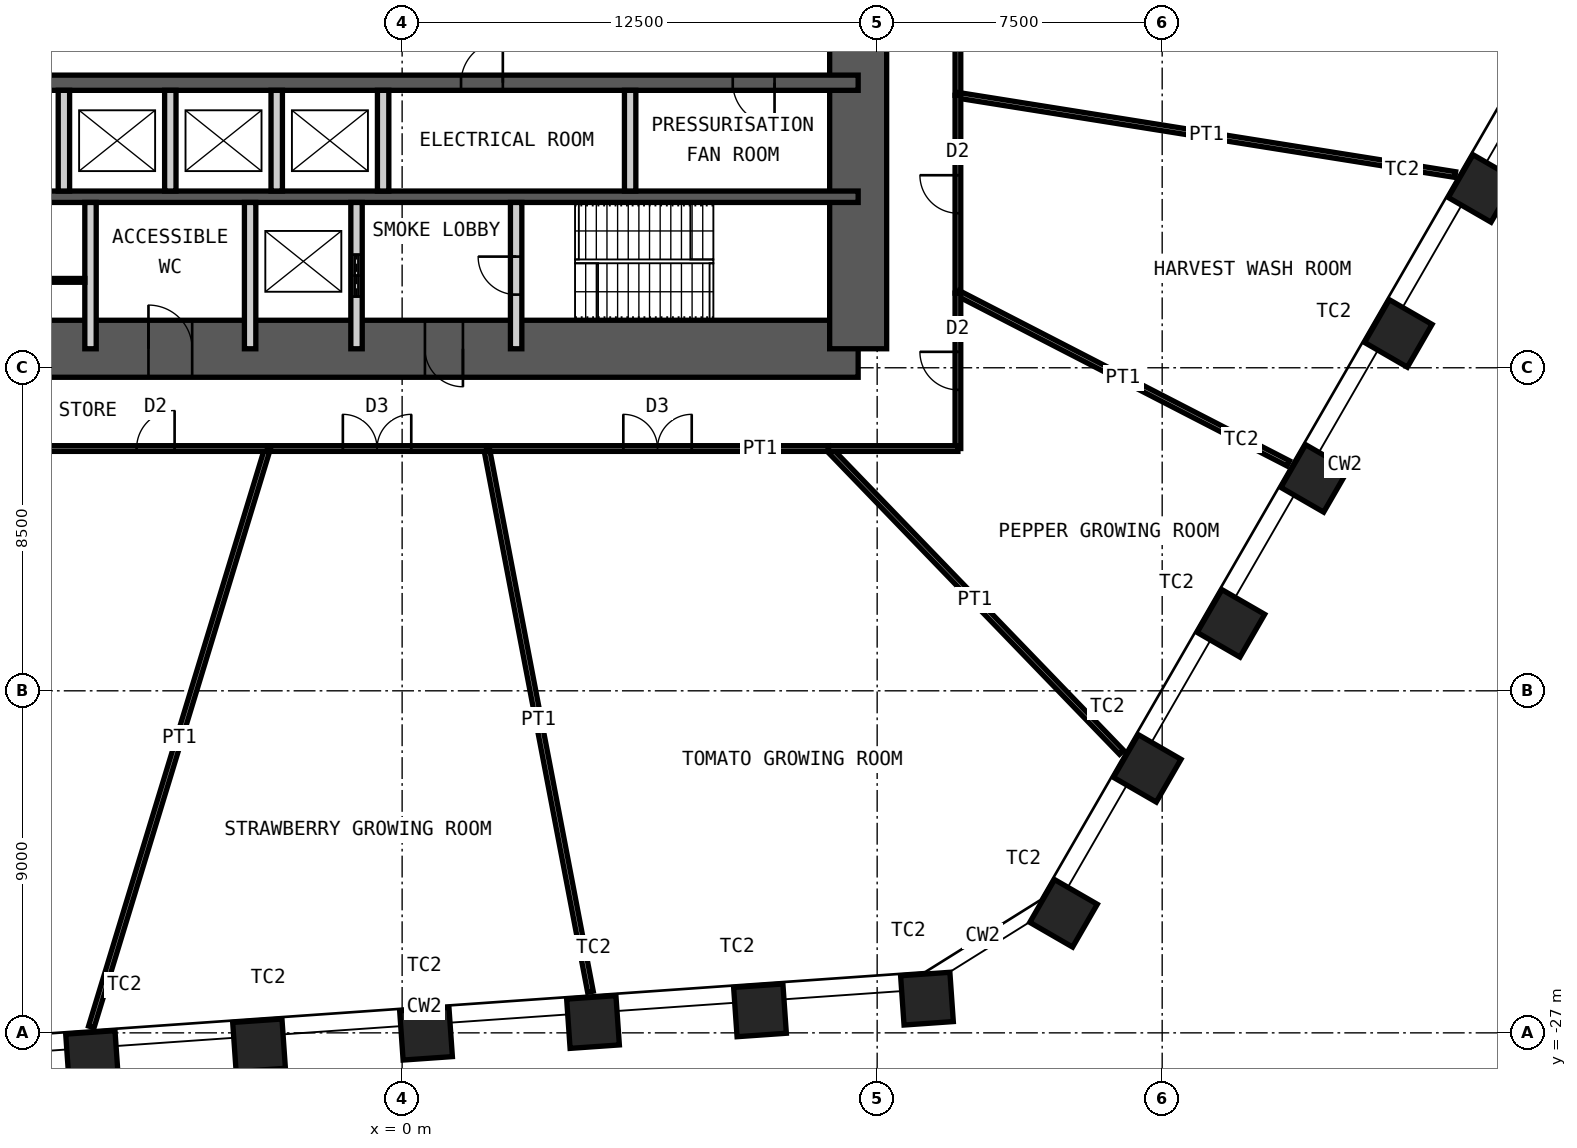
"""IFC4 building model, lengths in metres.
Left out: names, types, materials, properties, quantities, classifications, styles, units other than length and angle.
Written with IfcOpenShell. Run it as: python <this file> out.ifc"""

import sys

from ifc_helpers import new_model, si_unit, direction, frame, frame_2d, origin, origin_2d, place, context, subcontext, project, spatial, rectangle, hollow_rectangle, extrude, element, fill, save


model = new_model("IFC4")
c1 = context("Model", 3, precision=1e-05, world=origin(), true_north=direction((0.0, 1.0)))
c2 = subcontext(c1, "Body", "Model", "MODEL_VIEW")
j1 = project(units=[si_unit("LENGTHUNIT", "METRE"), si_unit("PLANEANGLEUNIT", "RADIAN")], contexts=[c1])
p1 = place(None, origin())
s1 = spatial("IfcSite", under=j1, at=p1, CompositionType="ELEMENT")
p2 = place(p1, origin())
s2 = spatial("IfcBuilding", under=s1, at=p2, CompositionType="ELEMENT")
p3 = place(p2, frame((0.0, 0.0, 72.0)))
s3 = spatial("IfcBuildingStorey", under=s2, at=p3, CompositionType="ELEMENT", Elevation=72.0)
for number, where, z_axis, x_axis in (
    (1, (28.416, -4.782, 0.0), (0.0, 0.0, 1.0), (0.5, 0.866, 0.0)),
    (2, (26.214, -8.596, 0.0), (0.0, 0.0, 1.0), (0.5, 0.866, 0.0)),
    (3, (24.011, -12.411, 0.0), (0.0, 0.0, 1.0), (0.5, 0.866, 0.0)),
    (4, (21.809, -16.225, 0.0), (0.0, 0.0, 1.0), (0.5, 0.866, 0.0)),
    (5, (19.607, -20.04, 0.0), (0.0, 0.0, 1.0), (0.5, 0.866, 0.0)),
    (6, (17.405, -23.854, 0.0), (0.0, 0.0, 1.0), (0.5, 0.866, 0.0)),
    (7, (13.811, -26.1, 0.0), (0.0, 0.0, 1.0), (0.998, 0.07, 0.0)),
    (8, (9.417, -26.407, 0.0), (0.0, 0.0, 1.0), (0.998, 0.07, 0.0)),
    (9, (5.023, -26.715, 0.0), (0.0, 0.0, 1.0), (0.998, 0.07, 0.0)),
    (10, (0.629, -27.022, 0.0), (0.0, 0.0, 1.0), (0.998, 0.07, 0.0)),
    (11, (-3.765, -27.329, 0.0), (0.0, 0.0, 1.0), (0.998, 0.07, 0.0)),
    (12, (-8.159, -27.636, 0.0), (0.0, 0.0, 1.0), (0.998, 0.07, 0.0)),
):
    element("IfcColumn", number, at=place(p3, frame(where, z_axis=z_axis, x_axis=x_axis)), inside=s3, PredefinedType="COLUMN", context=c2, shape_type="SweptSolid", body=[
        extrude(hollow_rectangle(XDim=1.3, YDim=1.3, WallThickness=0.1, at=origin_2d()), origin(), (0.0, 0.0, 1.0), 5.0),
    ])
p4 = place(p3, frame((-12.0, -9.0, 0.0), z_axis=(0.0, 0.0, 1.0), x_axis=(1.0, 0.0, 0.0)))
e13 = element("IfcWall", 13, at=p4, inside=s3, PredefinedType="SHEAR", context=c2, shape_type="SweptSolid", body=[
    extrude(rectangle(XDim=24.0, YDim=1.5, at=frame_2d((12.0, 0.0))), origin(), (0.0, 0.0, 1.0), 5.0),
])
p5 = place(p4, frame((1.35, 0.0, 0.0)))
e14 = element("IfcOpeningElement", 14, at=p5, cuts=e13, PredefinedType="OPENING", context=c2, shape_type="SweptSolid", body=[
    extrude(rectangle(XDim=1.0, YDim=2.1, at=frame_2d((0.5, 1.05))), frame((0.0, 0.76, 0.0), z_axis=(0.0, -1.0, 0.0), x_axis=(1.0, 0.0, 0.0)), (0.0, 0.0, 1.0), 1.52),
])
p6 = place(p4, frame((5.325, 0.0, 0.0)))
e15 = element("IfcOpeningElement", 15, at=p6, cuts=e13, PredefinedType="OPENING", context=c2, shape_type="SweptSolid", body=[
    extrude(rectangle(XDim=1.15, YDim=2.1, at=frame_2d((0.575, 1.05))), frame((0.0, 0.76, 0.0), z_axis=(0.0, -1.0, 0.0), x_axis=(1.0, 0.0, 0.0)), (0.0, 0.0, 1.0), 1.52),
])
p7 = place(p4, frame((12.6, 0.0, 0.0)))
e16 = element("IfcOpeningElement", 16, at=p7, cuts=e13, PredefinedType="OPENING", context=c2, shape_type="SweptSolid", body=[
    extrude(rectangle(XDim=1.0, YDim=2.1, at=frame_2d((0.5, 1.05))), frame((0.0, 0.76, 0.0), z_axis=(0.0, -1.0, 0.0), x_axis=(1.0, 0.0, 0.0)), (0.0, 0.0, 1.0), 1.52),
])
p8 = place(p3, frame((12.0, -9.0, 0.0), z_axis=(0.0, 0.0, 1.0), x_axis=(0.0, 1.0, 0.0)))
e17 = element("IfcWall", 17, at=p8, inside=s3, PredefinedType="SHEAR", context=c2, shape_type="SweptSolid", body=[
    extrude(rectangle(XDim=18.0, YDim=1.5, at=frame_2d((9.0, 0.0))), origin(), (0.0, 0.0, 1.0), 5.0),
])
p9 = place(p8, frame((8.1, 0.0, 0.0)))
e18 = element("IfcOpeningElement", 18, at=p9, cuts=e17, PredefinedType="OPENING", context=c2, shape_type="SweptSolid", body=[
    extrude(rectangle(XDim=1.8, YDim=2.1, at=frame_2d((0.9, 1.05))), frame((0.0, 0.76, 0.0), z_axis=(0.0, -1.0, 0.0), x_axis=(1.0, 0.0, 0.0)), (0.0, 0.0, 1.0), 1.52),
])
p10 = place(p3, frame((-12.0, -2.0, 0.0), z_axis=(0.0, 0.0, 1.0), x_axis=(1.0, 0.0, 0.0)))
e19 = element("IfcWall", 19, at=p10, inside=s3, PredefinedType="SHEAR", context=c2, shape_type="SweptSolid", body=[
    extrude(rectangle(XDim=24.0, YDim=0.4, at=frame_2d((12.0, 0.0))), origin(), (0.0, 0.0, 1.0), 5.0),
])
p11 = place(p10, frame((1.1, 0.0, 0.0)))
e20 = element("IfcOpeningElement", 20, at=p11, cuts=e19, PredefinedType="OPENING", context=c2, shape_type="SweptSolid", body=[
    extrude(rectangle(XDim=1.1, YDim=2.1, at=frame_2d((0.55, 1.05))), frame((0.0, 0.21, 0.0), z_axis=(0.0, -1.0, 0.0), x_axis=(1.0, 0.0, 0.0)), (0.0, 0.0, 1.0), 0.42),
])
p12 = place(p10, frame((13.55, 0.0, 0.0)))
e21 = element("IfcOpeningElement", 21, at=p12, cuts=e19, PredefinedType="OPENING", context=c2, shape_type="SweptSolid", body=[
    extrude(rectangle(XDim=1.1, YDim=2.1, at=frame_2d((0.55, 1.05))), frame((0.0, 0.21, 0.0), z_axis=(0.0, -1.0, 0.0), x_axis=(1.0, 0.0, 0.0)), (0.0, 0.0, 1.0), 0.42),
])
p13 = place(p10, frame((20.7, 0.0, 0.0)))
e22 = element("IfcOpeningElement", 22, at=p13, cuts=e19, PredefinedType="OPENING", context=c2, shape_type="SweptSolid", body=[
    extrude(rectangle(XDim=1.1, YDim=2.1, at=frame_2d((0.55, 1.05))), frame((0.0, 0.21, 0.0), z_axis=(0.0, -1.0, 0.0), x_axis=(1.0, 0.0, 0.0)), (0.0, 0.0, 1.0), 0.42),
])
p14 = place(p3, frame((-12.0, -5.0, 0.0), z_axis=(0.0, 0.0, 1.0), x_axis=(1.0, 0.0, 0.0)))
e23 = element("IfcWall", 23, at=p14, inside=s3, PredefinedType="SHEAR", context=c2, shape_type="SweptSolid", body=[
    extrude(rectangle(XDim=24.0, YDim=0.3, at=frame_2d((12.0, 0.0))), origin(), (0.0, 0.0, 1.0), 5.0),
])
for number, where, z_axis, x_axis in (
    (24, (-8.9, -4.85, 0.0), (0.0, 0.0, 1.0), (0.0, 1.0, 0.0)),
    (25, (-6.1, -4.85, 0.0), (0.0, 0.0, 1.0), (0.0, 1.0, 0.0)),
    (26, (-3.3, -4.85, 0.0), (0.0, 0.0, 1.0), (0.0, 1.0, 0.0)),
    (27, (-0.5, -4.85, 0.0), (0.0, 0.0, 1.0), (0.0, 1.0, 0.0)),
    (28, (6.0, -4.85, 0.0), (0.0, 0.0, 1.0), (0.0, 1.0, 0.0)),
):
    element("IfcWall", number, at=place(p3, frame(where, z_axis=z_axis, x_axis=x_axis)), inside=s3, PredefinedType="PARTITIONING", context=c2, shape_type="SweptSolid", body=[
        extrude(rectangle(XDim=2.65, YDim=0.3, at=frame_2d((1.325, 0.0))), origin(), (0.0, 0.0, 1.0), 4.78),
    ])
for number, where, z_axis, x_axis in (
    (29, (-8.2, -9.0, 0.0), (0.0, 0.0, 1.0), (0.0, 1.0, 0.0)),
    (30, (-4.0, -9.0, 0.0), (0.0, 0.0, 1.0), (0.0, 1.0, 0.0)),
):
    element("IfcWall", number, at=place(p3, frame(where, z_axis=z_axis, x_axis=x_axis)), inside=s3, PredefinedType="PARTITIONING", context=c2, shape_type="SweptSolid", body=[
        extrude(rectangle(XDim=3.85, YDim=0.3, at=frame_2d((1.925, 0.0))), origin(), (0.0, 0.0, 1.0), 4.78),
    ])
p15 = place(p3, frame((-1.2, -9.0, 0.0), z_axis=(0.0, 0.0, 1.0), x_axis=(0.0, 1.0, 0.0)))
e31 = element("IfcWall", 31, at=p15, inside=s3, PredefinedType="PARTITIONING", context=c2, shape_type="SweptSolid", body=[
    extrude(rectangle(XDim=3.85, YDim=0.3, at=frame_2d((1.925, 0.0))), origin(), (0.0, 0.0, 1.0), 4.78),
])
p16 = place(p15, frame((1.375, 0.0, 0.0)))
e32 = element("IfcOpeningElement", 32, at=p16, cuts=e31, PredefinedType="OPENING", context=c2, shape_type="SweptSolid", body=[
    extrude(rectangle(XDim=1.1, YDim=2.4, at=frame_2d((0.55, 1.2))), frame((0.0, 0.16, 0.0), z_axis=(0.0, -1.0, 0.0), x_axis=(1.0, 0.0, 0.0)), (0.0, 0.0, 1.0), 0.32),
])
p17 = place(p3, frame((3.0, -9.0, 0.0), z_axis=(0.0, 0.0, 1.0), x_axis=(0.0, 1.0, 0.0)))
e33 = element("IfcWall", 33, at=p17, inside=s3, PredefinedType="PARTITIONING", context=c2, shape_type="SweptSolid", body=[
    extrude(rectangle(XDim=3.85, YDim=0.3, at=frame_2d((1.925, 0.0))), origin(), (0.0, 0.0, 1.0), 4.78),
])
p18 = place(p17, frame((1.425, 0.0, 0.0)))
e34 = element("IfcOpeningElement", 34, at=p18, cuts=e33, PredefinedType="OPENING", context=c2, shape_type="SweptSolid", body=[
    extrude(rectangle(XDim=1.0, YDim=2.1, at=frame_2d((0.5, 1.05))), frame((0.0, 0.16, 0.0), z_axis=(0.0, -1.0, 0.0), x_axis=(1.0, 0.0, 0.0)), (0.0, 0.0, 1.0), 0.32),
])
p19 = place(p3, frame((-11.25, -7.2, 0.0), z_axis=(0.0, 0.0, 1.0), x_axis=(1.0, 0.0, 0.0)))
e35 = element("IfcWall", 35, at=p19, inside=s3, PredefinedType="PARTITIONING", context=c2, shape_type="SweptSolid", body=[
    extrude(rectangle(XDim=2.9, YDim=0.1, at=frame_2d((1.45, 0.0))), origin(), (0.0, 0.0, 1.0), 4.78),
])
p20 = place(p19, frame((0.1, 0.0, 0.0)))
e36 = element("IfcOpeningElement", 36, at=p20, cuts=e35, PredefinedType="OPENING", context=c2, shape_type="SweptSolid", body=[
    extrude(rectangle(XDim=1.0, YDim=2.4, at=frame_2d((0.5, 1.2))), frame((0.0, 0.06, 0.0), z_axis=(0.0, -1.0, 0.0), x_axis=(1.0, 0.0, 0.0)), (0.0, 0.0, 1.0), 0.12),
])
p21 = place(p3, frame((18.931, -19.618, 0.0), z_axis=(0.0, 0.0, 1.0), x_axis=(-0.694400324326, 0.719588903178, 0.0)))
e37 = element("IfcWall", 37, at=p21, inside=s3, PredefinedType="PARTITIONING", context=c2, shape_type="SweptSolid", body=[
    extrude(rectangle(XDim=11.108, YDim=0.15, at=frame_2d((5.554, 0.0))), origin(), (0.0, 0.0, 1.0), 3.7),
])
p22 = place(p3, frame((11.218, -11.625, 0.0), z_axis=(0.0, 0.0, 1.0), x_axis=(-1.0, 0.0, 0.0)))
e38 = element("IfcWall", 38, at=p22, inside=s3, PredefinedType="PARTITIONING", context=c2, shape_type="SweptSolid", body=[
    extrude(rectangle(XDim=8.996, YDim=0.15, at=frame_2d((4.498, 0.0))), origin(), (0.0, 0.0, 1.0), 4.8),
])
p23 = place(p22, frame((3.598, 0.0, 0.0)))
e39 = element("IfcOpeningElement", 39, at=p23, cuts=e38, PredefinedType="OPENING", context=c2, shape_type="SweptSolid", body=[
    extrude(rectangle(XDim=1.8, YDim=2.4, at=frame_2d((0.9, 1.2))), frame((0.0, 0.085, 0.0), z_axis=(0.0, -1.0, 0.0), x_axis=(1.0, 0.0, 0.0)), (0.0, 0.0, 1.0), 0.17),
])
p24 = place(p3, frame((4.955, -25.918, 0.0), z_axis=(0.0, 0.0, 1.0), x_axis=(-0.187785090129, 0.98221014041, 0.0)))
e40 = element("IfcWall", 40, at=p24, inside=s3, PredefinedType="PARTITIONING", context=c2, shape_type="SweptSolid", body=[
    extrude(rectangle(XDim=14.552, YDim=0.15, at=frame_2d((7.276, 0.0))), origin(), (0.0, 0.0, 1.0), 3.7),
])
p25 = place(p3, frame((2.222, -11.625, 0.0), z_axis=(0.0, 0.0, 1.0), x_axis=(-1.0, 0.0, 0.0)))
e41 = element("IfcWall", 41, at=p25, inside=s3, PredefinedType="PARTITIONING", context=c2, shape_type="SweptSolid", body=[
    extrude(rectangle(XDim=5.764, YDim=0.15, at=frame_2d((2.882, 0.0))), origin(), (0.0, 0.0, 1.0), 4.8),
])
p26 = place(p25, frame((1.982, 0.0, 0.0)))
e42 = element("IfcOpeningElement", 42, at=p26, cuts=e41, PredefinedType="OPENING", context=c2, shape_type="SweptSolid", body=[
    extrude(rectangle(XDim=1.8, YDim=2.4, at=frame_2d((0.9, 1.2))), frame((0.0, 0.085, 0.0), z_axis=(0.0, -1.0, 0.0), x_axis=(1.0, 0.0, 0.0)), (0.0, 0.0, 1.0), 0.17),
])
p27 = place(p3, frame((-8.179, -26.843, 0.0), z_axis=(0.0, 0.0, 1.0), x_axis=(0.291466333136, 0.956581087336, 0.0)))
e43 = element("IfcWall", 43, at=p27, inside=s3, PredefinedType="PARTITIONING", context=c2, shape_type="SweptSolid", body=[
    extrude(rectangle(XDim=15.908, YDim=0.15, at=frame_2d((7.954, 0.0))), origin(), (0.0, 0.0, 1.0), 3.7),
])
p28 = place(p3, frame((-3.542, -11.625, 0.0), z_axis=(0.0, 0.0, 1.0), x_axis=(-1.0, 0.0, 0.0)))
e44 = element("IfcWall", 44, at=p28, inside=s3, PredefinedType="PARTITIONING", context=c2, shape_type="SweptSolid", body=[
    extrude(rectangle(XDim=5.89, YDim=0.15, at=frame_2d((2.945, 0.0))), origin(), (0.0, 0.0, 1.0), 4.8),
])
p29 = place(p28, frame((2.445, 0.0, 0.0)))
e45 = element("IfcOpeningElement", 45, at=p29, cuts=e44, PredefinedType="OPENING", context=c2, shape_type="SweptSolid", body=[
    extrude(rectangle(XDim=1.0, YDim=2.4, at=frame_2d((0.5, 1.2))), frame((0.0, 0.085, 0.0), z_axis=(0.0, -1.0, 0.0), x_axis=(1.0, 0.0, 0.0)), (0.0, 0.0, 1.0), 0.17),
])
p30 = place(p3, frame((14.625, 3.391, 0.0), z_axis=(0.0, 0.0, 1.0), x_axis=(0.0, -1.0, 0.0)))
e46 = element("IfcWall", 46, at=p30, inside=s3, PredefinedType="PARTITIONING", context=c2, shape_type="SweptSolid", body=[
    extrude(rectangle(XDim=5.722, YDim=0.15, at=frame_2d((2.861, 0.0))), origin(), (0.0, 0.0, 1.0), 4.8),
])
p31 = place(p30, frame((2.361, 0.0, 0.0)))
e47 = element("IfcOpeningElement", 47, at=p31, cuts=e46, PredefinedType="OPENING", context=c2, shape_type="SweptSolid", body=[
    extrude(rectangle(XDim=1.0, YDim=2.4, at=frame_2d((0.5, 1.2))), frame((0.0, 0.085, 0.0), z_axis=(0.0, -1.0, 0.0), x_axis=(1.0, 0.0, 0.0)), (0.0, 0.0, 1.0), 0.17),
])
p32 = place(p3, frame((27.711, -4.416, 0.0), z_axis=(0.0, 0.0, 1.0), x_axis=(-0.987538625309, 0.15737682016, 0.0)))
e48 = element("IfcWall", 48, at=p32, inside=s3, PredefinedType="PARTITIONING", context=c2, shape_type="SweptSolid", body=[
    extrude(rectangle(XDim=13.251, YDim=0.15, at=frame_2d((6.625, 0.0))), origin(), (0.0, 0.0, 1.0), 3.7),
])
p33 = place(p3, frame((14.625, -2.331, 0.0), z_axis=(0.0, 0.0, 1.0), x_axis=(0.0, -1.0, 0.0)))
e49 = element("IfcWall", 49, at=p33, inside=s3, PredefinedType="PARTITIONING", context=c2, shape_type="SweptSolid", body=[
    extrude(rectangle(XDim=5.206, YDim=0.15, at=frame_2d((2.603, 0.0))), origin(), (0.0, 0.0, 1.0), 4.8),
])
p34 = place(p33, frame((2.103, 0.0, 0.0)))
e50 = element("IfcOpeningElement", 50, at=p34, cuts=e49, PredefinedType="OPENING", context=c2, shape_type="SweptSolid", body=[
    extrude(rectangle(XDim=1.0, YDim=2.4, at=frame_2d((0.5, 1.2))), frame((0.0, 0.085, 0.0), z_axis=(0.0, -1.0, 0.0), x_axis=(1.0, 0.0, 0.0)), (0.0, 0.0, 1.0), 0.17),
])
p35 = place(p3, frame((23.316, -12.015, 0.0), z_axis=(0.0, 0.0, 1.0), x_axis=(-0.888917561609, 0.458067209767, 0.0)))
e51 = element("IfcWall", 51, at=p35, inside=s3, PredefinedType="PARTITIONING", context=c2, shape_type="SweptSolid", body=[
    extrude(rectangle(XDim=9.778, YDim=0.15, at=frame_2d((4.889, 0.0))), origin(), (0.0, 0.0, 1.0), 3.7),
])
p36 = place(p3, frame((14.625, -7.536, 0.0), z_axis=(0.0, 0.0, 1.0), x_axis=(0.0, -1.0, 0.0)))
e52 = element("IfcWall", 52, at=p36, inside=s3, PredefinedType="PARTITIONING", context=c2, shape_type="SweptSolid", body=[
    extrude(rectangle(XDim=4.089, YDim=0.15, at=frame_2d((2.044, 0.0))), origin(), (0.0, 0.0, 1.0), 4.8),
])
p37 = place(p36, frame((1.544, 0.0, 0.0)))
e53 = element("IfcOpeningElement", 53, at=p37, cuts=e52, PredefinedType="OPENING", context=c2, shape_type="SweptSolid", body=[
    extrude(rectangle(XDim=1.0, YDim=2.4, at=frame_2d((0.5, 1.2))), frame((0.0, 0.085, 0.0), z_axis=(0.0, -1.0, 0.0), x_axis=(1.0, 0.0, 0.0)), (0.0, 0.0, 1.0), 0.17),
])
p38 = place(p3, frame((14.625, -11.625, 0.0), z_axis=(0.0, 0.0, 1.0), x_axis=(-1.0, 0.0, 0.0)))
e54 = element("IfcWall", 54, at=p38, inside=s3, PredefinedType="PARTITIONING", context=c2, shape_type="SweptSolid", body=[
    extrude(rectangle(XDim=3.407, YDim=0.15, at=frame_2d((1.704, 0.0))), origin(), (0.0, 0.0, 1.0), 4.8),
])
p39 = place(p6, origin())
e55 = element("IfcDoor", 55, at=p39, inside=s3, OperationType="SINGLE_SWING_RIGHT", PredefinedType="DOOR", context=c2, shape_type="SweptSolid", body=[
    extrude(rectangle(XDim=1.15, YDim=2.1, at=frame_2d((0.575, 1.05))), frame((0.0, 0.025, 0.0), z_axis=(0.0, -1.0, 0.0), x_axis=(1.0, 0.0, 0.0)), (0.0, 0.0, 1.0), 0.05),
])
fill(e15, e55)
p40 = place(p7, origin())
e56 = element("IfcDoor", 56, at=p40, inside=s3, OperationType="SINGLE_SWING_RIGHT", PredefinedType="DOOR", context=c2, shape_type="SweptSolid", body=[
    extrude(rectangle(XDim=1.0, YDim=2.1, at=frame_2d((0.5, 1.05))), frame((0.0, 0.025, 0.0), z_axis=(0.0, -1.0, 0.0), x_axis=(1.0, 0.0, 0.0)), (0.0, 0.0, 1.0), 0.05),
])
fill(e16, e56)
p41 = place(p18, origin())
e57 = element("IfcDoor", 57, at=p41, inside=s3, OperationType="SINGLE_SWING_LEFT", PredefinedType="DOOR", context=c2, shape_type="SweptSolid", body=[
    extrude(rectangle(XDim=1.0, YDim=2.1, at=frame_2d((0.5, 1.05))), frame((0.0, 0.025, 0.0), z_axis=(0.0, -1.0, 0.0), x_axis=(1.0, 0.0, 0.0)), (0.0, 0.0, 1.0), 0.05),
])
fill(e34, e57)
p42 = place(p12, origin())
e58 = element("IfcDoor", 58, at=p42, inside=s3, OperationType="SINGLE_SWING_LEFT", PredefinedType="DOOR", context=c2, shape_type="SweptSolid", body=[
    extrude(rectangle(XDim=1.1, YDim=2.1, at=frame_2d((0.55, 1.05))), frame((0.0, 0.025, 0.0), z_axis=(0.0, -1.0, 0.0), x_axis=(1.0, 0.0, 0.0)), (0.0, 0.0, 1.0), 0.05),
])
fill(e21, e58)
p43 = place(p13, origin())
e59 = element("IfcDoor", 59, at=p43, inside=s3, OperationType="SINGLE_SWING_RIGHT", PredefinedType="DOOR", context=c2, shape_type="SweptSolid", body=[
    extrude(rectangle(XDim=1.1, YDim=2.1, at=frame_2d((0.55, 1.05))), frame((0.0, 0.025, 0.0), z_axis=(0.0, -1.0, 0.0), x_axis=(1.0, 0.0, 0.0)), (0.0, 0.0, 1.0), 0.05),
])
fill(e22, e59)
p44 = place(p16, origin())
e60 = element("IfcDoor", 60, at=p44, inside=s3, OperationType="DOUBLE_DOOR_SLIDING", PredefinedType="DOOR", context=c2, shape_type="SweptSolid", body=[
    extrude(rectangle(XDim=1.1, YDim=2.4, at=frame_2d((0.55, 1.2))), frame((0.0, 0.025, 0.0), z_axis=(0.0, -1.0, 0.0), x_axis=(1.0, 0.0, 0.0)), (0.0, 0.0, 1.0), 0.05),
])
fill(e32, e60)
p45 = place(p23, origin())
e61 = element("IfcDoor", 61, at=p45, inside=s3, OperationType="DOUBLE_DOOR_DOUBLE_SWING", PredefinedType="DOOR", context=c2, shape_type="SweptSolid", body=[
    extrude(rectangle(XDim=1.8, YDim=2.4, at=frame_2d((0.9, 1.2))), frame((0.0, 0.025, 0.0), z_axis=(0.0, -1.0, 0.0), x_axis=(1.0, 0.0, 0.0)), (0.0, 0.0, 1.0), 0.05),
])
fill(e39, e61)
p46 = place(p26, origin())
e62 = element("IfcDoor", 62, at=p46, inside=s3, OperationType="DOUBLE_DOOR_DOUBLE_SWING", PredefinedType="DOOR", context=c2, shape_type="SweptSolid", body=[
    extrude(rectangle(XDim=1.8, YDim=2.4, at=frame_2d((0.9, 1.2))), frame((0.0, 0.025, 0.0), z_axis=(0.0, -1.0, 0.0), x_axis=(1.0, 0.0, 0.0)), (0.0, 0.0, 1.0), 0.05),
])
fill(e42, e62)
p47 = place(p29, origin())
e63 = element("IfcDoor", 63, at=p47, inside=s3, OperationType="SINGLE_SWING_LEFT", PredefinedType="DOOR", context=c2, shape_type="SweptSolid", body=[
    extrude(rectangle(XDim=1.0, YDim=2.4, at=frame_2d((0.5, 1.2))), frame((0.0, 0.025, 0.0), z_axis=(0.0, -1.0, 0.0), x_axis=(1.0, 0.0, 0.0)), (0.0, 0.0, 1.0), 0.05),
])
fill(e45, e63)
p48 = place(p34, origin())
e64 = element("IfcDoor", 64, at=p48, inside=s3, OperationType="SINGLE_SWING_LEFT", PredefinedType="DOOR", context=c2, shape_type="SweptSolid", body=[
    extrude(rectangle(XDim=1.0, YDim=2.4, at=frame_2d((0.5, 1.2))), frame((0.0, 0.025, 0.0), z_axis=(0.0, -1.0, 0.0), x_axis=(1.0, 0.0, 0.0)), (0.0, 0.0, 1.0), 0.05),
])
fill(e50, e64)
p49 = place(p37, origin())
e65 = element("IfcDoor", 65, at=p49, inside=s3, OperationType="SINGLE_SWING_LEFT", PredefinedType="DOOR", context=c2, shape_type="SweptSolid", body=[
    extrude(rectangle(XDim=1.0, YDim=2.4, at=frame_2d((0.5, 1.2))), frame((0.0, 0.025, 0.0), z_axis=(0.0, -1.0, 0.0), x_axis=(1.0, 0.0, 0.0)), (0.0, 0.0, 1.0), 0.05),
])
fill(e53, e65)
save(model, sys.argv[1])
